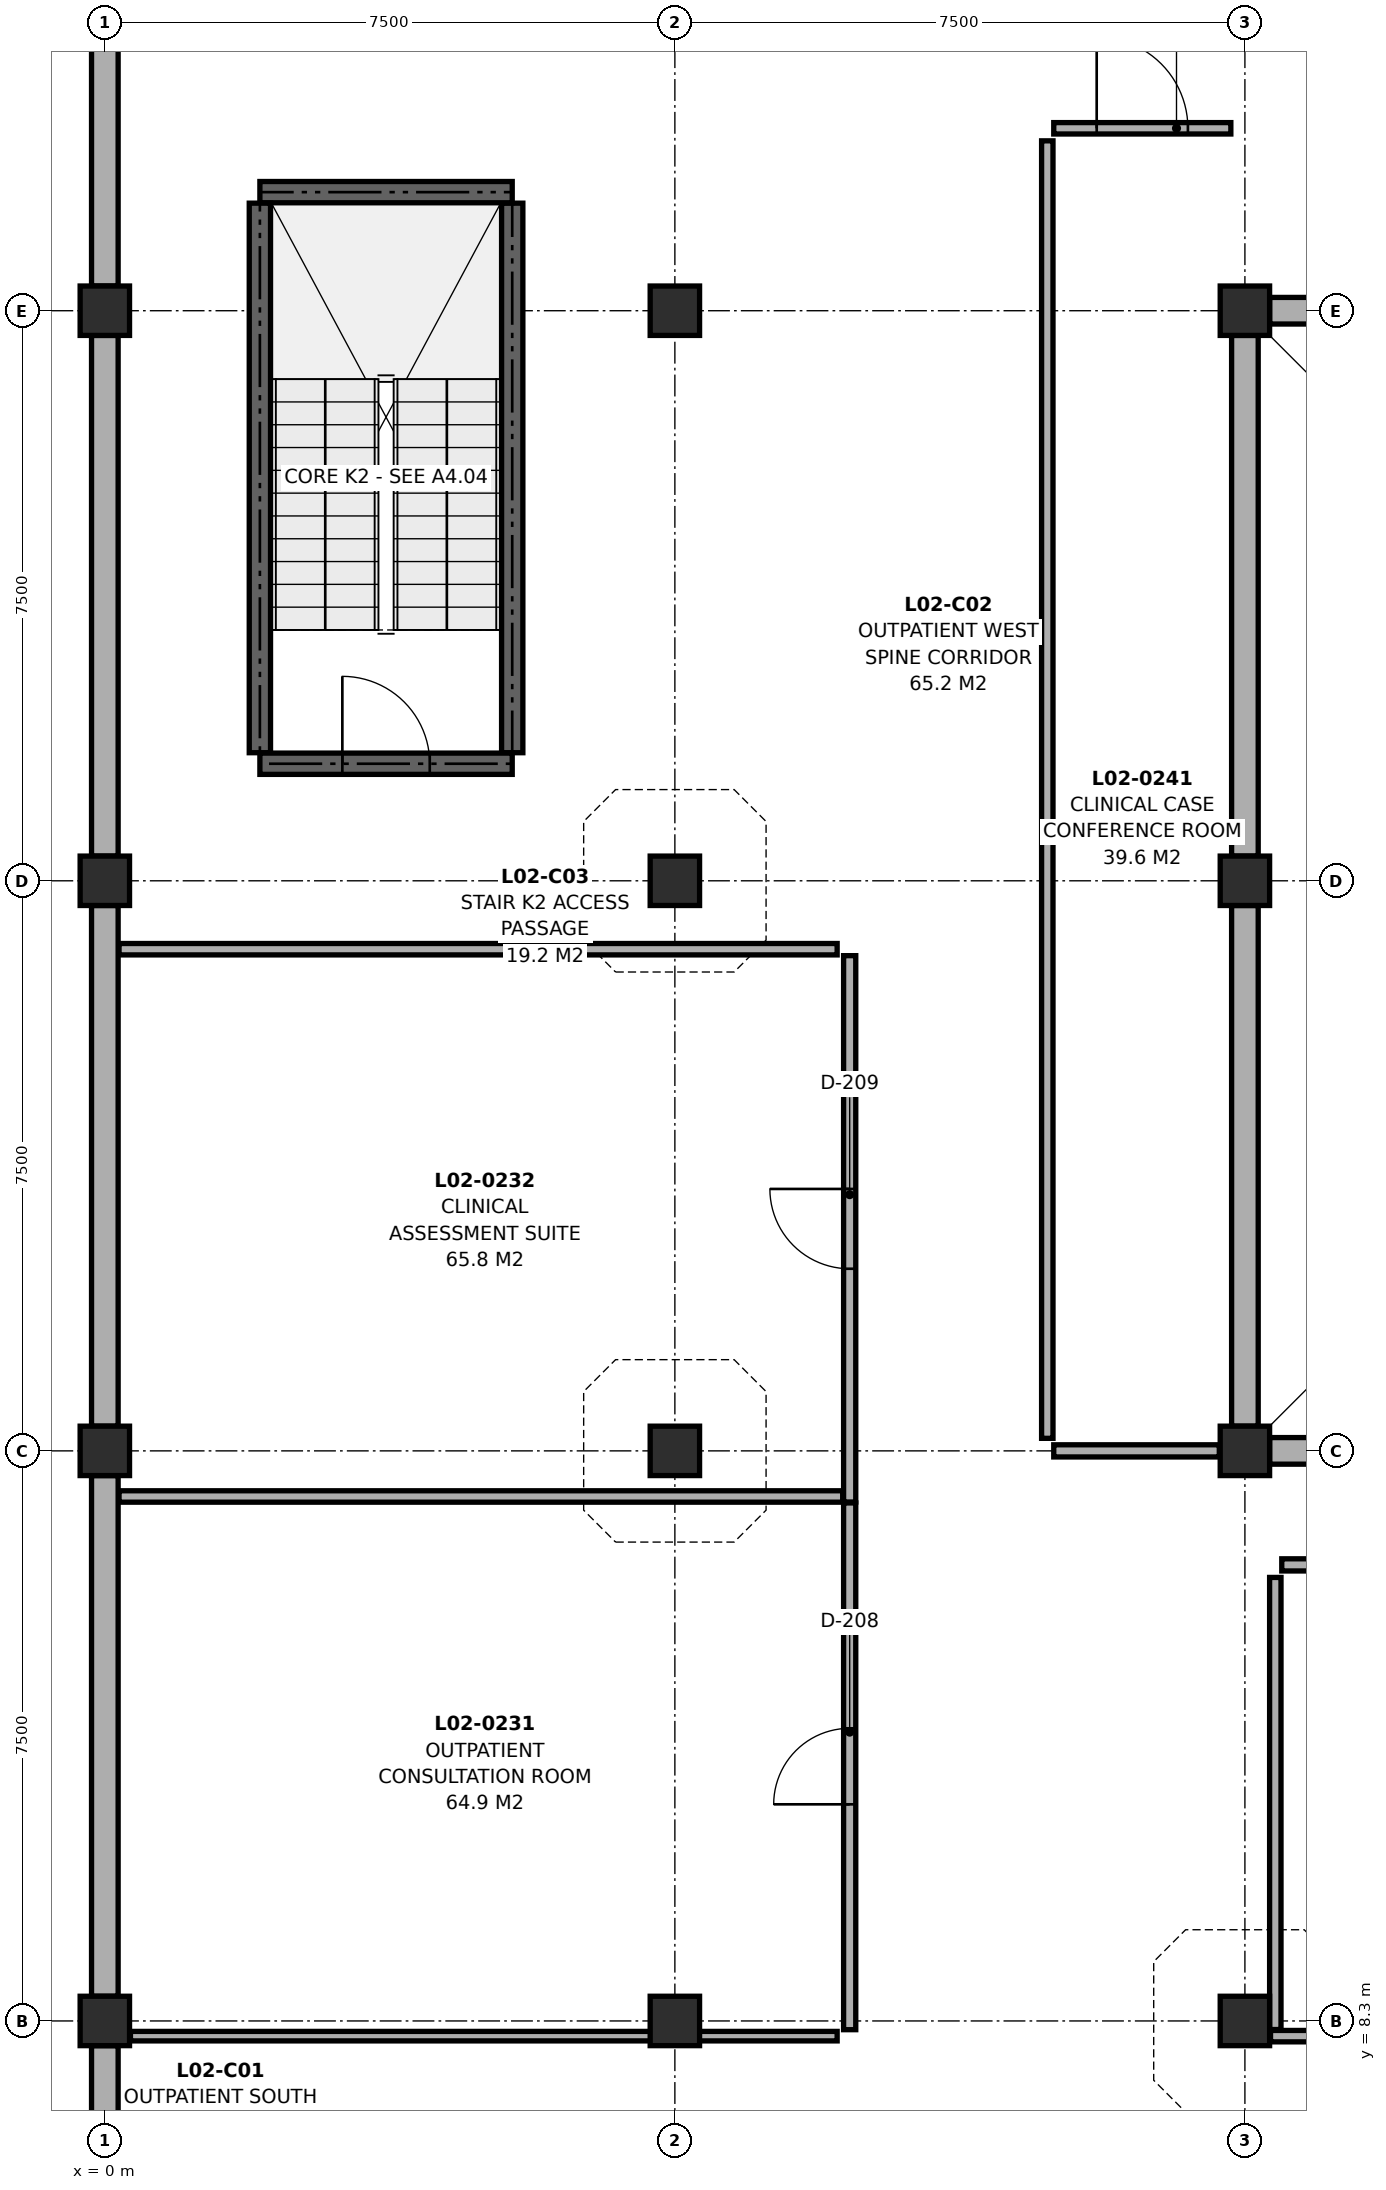
"""IFC4 building model, lengths in metres.
Left out: names, types, materials, properties, quantities, classifications, styles, units other than length and angle.
Written with IfcOpenShell. Run it as: python <this file> out.ifc"""

import sys

from ifc_helpers import new_model, si_unit, direction, frame, frame_2d, origin, origin_2d, place, context, subcontext, project, spatial, rectangle, extrude, element, fill, save


model = new_model("IFC4")
c1 = context("Model", 3, precision=1e-05, world=origin(), true_north=direction((0.0, 1.0)))
c2 = subcontext(c1, "Body", "Model", "MODEL_VIEW")
j1 = project(units=[si_unit("LENGTHUNIT", "METRE"), si_unit("PLANEANGLEUNIT", "RADIAN")], contexts=[c1])
p1 = place(None, origin())
s1 = spatial("IfcSite", under=j1, at=p1, CompositionType="ELEMENT")
p2 = place(p1, origin())
s2 = spatial("IfcBuilding", under=s1, at=p2, CompositionType="ELEMENT")
p3 = place(p2, frame((0.0, 0.0, 9.5)))
s3 = spatial("IfcBuildingStorey", under=s2, at=p3, CompositionType="ELEMENT", Elevation=9.5)
for number, where, z_axis, x_axis in (
    (1, (0.0, 8.3, 0.0), (0.0, 0.0, 1.0), (1.0, 0.0, 0.0)),
    (2, (0.0, 15.8, 0.0), (0.0, 0.0, 1.0), (1.0, 0.0, 0.0)),
    (3, (0.0, 23.3, 0.0), (0.0, 0.0, 1.0), (1.0, 0.0, 0.0)),
    (4, (0.0, 30.8, 0.0), (0.0, 0.0, 1.0), (1.0, 0.0, 0.0)),
    (5, (7.5, 8.3, 0.0), (0.0, 0.0, 1.0), (1.0, 0.0, 0.0)),
    (6, (7.5, 15.8, 0.0), (0.0, 0.0, 1.0), (1.0, 0.0, 0.0)),
    (7, (7.5, 23.3, 0.0), (0.0, 0.0, 1.0), (1.0, 0.0, 0.0)),
    (8, (7.5, 30.8, 0.0), (0.0, 0.0, 1.0), (1.0, 0.0, 0.0)),
    (9, (15.0, 8.3, 0.0), (0.0, 0.0, 1.0), (1.0, 0.0, 0.0)),
    (10, (15.0, 15.8, 0.0), (0.0, 0.0, 1.0), (1.0, 0.0, 0.0)),
    (11, (15.0, 23.3, 0.0), (0.0, 0.0, 1.0), (1.0, 0.0, 0.0)),
    (12, (15.0, 30.8, 0.0), (0.0, 0.0, 1.0), (1.0, 0.0, 0.0)),
):
    element("IfcColumn", number, at=place(p3, frame(where, z_axis=z_axis, x_axis=x_axis)), inside=s3, PredefinedType="COLUMN", context=c2, shape_type="SweptSolid", body=[
        extrude(rectangle(XDim=0.65, YDim=0.65, at=origin_2d()), origin(), (0.0, 0.0, 1.0), 3.7),
    ])
p4 = place(p3, frame((0.0, 1.125, 0.0), z_axis=(0.0, 0.0, 1.0), x_axis=(0.0, 1.0, 0.0)))
e13 = element("IfcWall", 13, at=p4, inside=s3, PredefinedType="SOLIDWALL", context=c2, shape_type="SweptSolid", body=[
    extrude(rectangle(XDim=6.85, YDim=0.35, at=frame_2d((3.425, 0.0))), origin(), (0.0, 0.0, 1.0), 2.985),
])
for number, where, z_axis, x_axis in (
    (14, (0.0, 8.625, 0.0), (0.0, 0.0, 1.0), (0.0, 1.0, 0.0)),
    (15, (0.0, 16.125, 0.0), (0.0, 0.0, 1.0), (0.0, 1.0, 0.0)),
    (16, (0.0, 23.625, 0.0), (0.0, 0.0, 1.0), (0.0, 1.0, 0.0)),
    (17, (0.0, 31.125, 0.0), (0.0, 0.0, 1.0), (0.0, 1.0, 0.0)),
    (18, (15.325, 15.8, 0.0), (0.0, 0.0, 1.0), (1.0, 0.0, 0.0)),
    (19, (22.175, 30.8, 0.0), (0.0, 0.0, 1.0), (-1.0, 0.0, 0.0)),
    (20, (15.0, 30.475, 0.0), (0.0, 0.0, 1.0), (0.0, -1.0, 0.0)),
    (21, (15.0, 22.975, 0.0), (0.0, 0.0, 1.0), (0.0, -1.0, 0.0)),
):
    element("IfcWall", number, at=place(p3, frame(where, z_axis=z_axis, x_axis=x_axis)), inside=s3, PredefinedType="SOLIDWALL", context=c2, shape_type="SweptSolid", body=[
        extrude(rectangle(XDim=6.85, YDim=0.35, at=frame_2d((3.425, 0.0))), origin(), (0.0, 0.0, 1.0), 2.785),
    ])
p5 = place(p3, frame((5.36, 24.985, 0.0), z_axis=(0.0, 0.0, 1.0), x_axis=(0.0, 1.0, 0.0)))
e22 = element("IfcWall", 22, at=p5, inside=s3, PredefinedType="SHEAR", context=c2, shape_type="SweptSolid", body=[
    extrude(rectangle(XDim=7.23, YDim=0.28, at=frame_2d((3.615, 0.0))), origin(), (0.0, 0.0, 1.0), 3.7),
])
p6 = place(p3, frame((5.36, 32.36, 0.0), z_axis=(0.0, 0.0, 1.0), x_axis=(-1.0, 0.0, 0.0)))
e23 = element("IfcWall", 23, at=p6, inside=s3, PredefinedType="SHEAR", context=c2, shape_type="SweptSolid", body=[
    extrude(rectangle(XDim=3.32, YDim=0.28, at=frame_2d((1.66, 0.0))), origin(), (0.0, 0.0, 1.0), 3.7),
])
p7 = place(p3, frame((2.04, 32.215, 0.0), z_axis=(0.0, 0.0, 1.0), x_axis=(0.0, -1.0, 0.0)))
e24 = element("IfcWall", 24, at=p7, inside=s3, PredefinedType="SHEAR", context=c2, shape_type="SweptSolid", body=[
    extrude(rectangle(XDim=7.23, YDim=0.28, at=frame_2d((3.615, 0.0))), origin(), (0.0, 0.0, 1.0), 3.7),
])
p8 = place(p3, frame((2.04, 24.84, 0.0), z_axis=(0.0, 0.0, 1.0), x_axis=(1.0, 0.0, 0.0)))
e25 = element("IfcWall", 25, at=p8, inside=s3, PredefinedType="SHEAR", context=c2, shape_type="SweptSolid", body=[
    extrude(rectangle(XDim=3.32, YDim=0.28, at=frame_2d((1.66, 0.0))), origin(), (0.0, 0.0, 1.0), 3.7),
])
p9 = place(p8, frame((1.085, 0.0, 0.0)))
e26 = element("IfcOpeningElement", 26, at=p9, cuts=e25, PredefinedType="OPENING", context=c2, shape_type="SweptSolid", body=[
    extrude(rectangle(XDim=1.15, YDim=2.15, at=frame_2d((0.575, 1.075))), frame((0.0, 0.152, 0.0), z_axis=(0.0, -1.0, 0.0), x_axis=(1.0, 0.0, 0.0)), (0.0, 0.0, 1.0), 0.304),
])
p10 = place(p3, frame((15.337, 8.1, 0.0), z_axis=(0.0, 0.0, 1.0), x_axis=(1.0, 0.0, 0.0)))
e27 = element("IfcWall", 27, at=p10, inside=s3, PredefinedType="PARTITIONING", context=c2, shape_type="SweptSolid", body=[
    extrude(rectangle(XDim=14.571, YDim=0.15, at=frame_2d((7.286, 0.0))), origin(), (0.0, 0.0, 1.0), 2.785),
])
p11 = place(p10, frame((7.677, 0.0, 0.0)))
e28 = element("IfcOpeningElement", 28, at=p11, cuts=e27, PredefinedType="OPENING", context=c2, shape_type="SweptSolid", body=[
    extrude(rectangle(XDim=1.56, YDim=2.3, at=frame_2d((0.78, 1.15))), frame((0.0, 0.087, 0.0), z_axis=(0.0, -1.0, 0.0), x_axis=(1.0, 0.0, 0.0)), (0.0, 0.0, 1.0), 0.174),
])
p12 = place(p3, frame((9.8, 8.185, 0.0), z_axis=(0.0, 0.0, 1.0), x_axis=(0.0, 1.0, 0.0)))
e29 = element("IfcWall", 29, at=p12, inside=s3, PredefinedType="PARTITIONING", context=c2, shape_type="SweptSolid", body=[
    extrude(rectangle(XDim=6.93, YDim=0.16, at=frame_2d((3.465, 0.0))), origin(), (0.0, 0.0, 1.0), 2.785),
])
p13 = place(p12, frame((2.965, 0.0, 0.0)))
e30 = element("IfcOpeningElement", 30, at=p13, cuts=e29, PredefinedType="OPENING", context=c2, shape_type="SweptSolid", body=[
    extrude(rectangle(XDim=1.0, YDim=2.15, at=frame_2d((0.5, 1.075))), frame((0.0, 0.092, 0.0), z_axis=(0.0, -1.0, 0.0), x_axis=(1.0, 0.0, 0.0)), (0.0, 0.0, 1.0), 0.184),
])
p14 = place(p3, frame((9.8, 15.127, 0.0), z_axis=(0.0, 0.0, 1.0), x_axis=(0.0, 1.0, 0.0)))
e31 = element("IfcWall", 31, at=p14, inside=s3, PredefinedType="PARTITIONING", context=c2, shape_type="SweptSolid", body=[
    extrude(rectangle(XDim=7.188, YDim=0.16, at=frame_2d((3.594, 0.0))), origin(), (0.0, 0.0, 1.0), 2.785),
])
p15 = place(p14, frame((3.069, 0.0, 0.0)))
e32 = element("IfcOpeningElement", 32, at=p15, cuts=e31, PredefinedType="OPENING", context=c2, shape_type="SweptSolid", body=[
    extrude(rectangle(XDim=1.05, YDim=2.15, at=frame_2d((0.525, 1.075))), frame((0.0, 0.092, 0.0), z_axis=(0.0, -1.0, 0.0), x_axis=(1.0, 0.0, 0.0)), (0.0, 0.0, 1.0), 0.184),
])
p16 = place(p3, frame((12.485, 33.2, 0.0), z_axis=(0.0, 0.0, 1.0), x_axis=(1.0, 0.0, 0.0)))
e33 = element("IfcWall", 33, at=p16, inside=s3, PredefinedType="PARTITIONING", context=c2, shape_type="SweptSolid", body=[
    extrude(rectangle(XDim=2.33, YDim=0.15, at=frame_2d((1.165, 0.0))), origin(), (0.0, 0.0, 1.0), 2.785),
])
p17 = place(p16, frame((0.565, 0.0, 0.0)))
e34 = element("IfcOpeningElement", 34, at=p17, cuts=e33, PredefinedType="OPENING", context=c2, shape_type="SweptSolid", body=[
    extrude(rectangle(XDim=1.2, YDim=2.15, at=frame_2d((0.6, 1.075))), frame((0.0, 0.087, 0.0), z_axis=(0.0, -1.0, 0.0), x_axis=(1.0, 0.0, 0.0)), (0.0, 0.0, 1.0), 0.174),
])
p18 = place(p3, frame((15.485, 14.3, 0.0), z_axis=(0.0, 0.0, 1.0), x_axis=(1.0, 0.0, 0.0)))
e35 = element("IfcWall", 35, at=p18, inside=s3, PredefinedType="PARTITIONING", context=c2, shape_type="SweptSolid", body=[
    extrude(rectangle(XDim=14.59, YDim=0.16, at=frame_2d((7.295, 0.0))), origin(), (0.0, 0.0, 1.0), 2.785),
])
p19 = place(p3, frame((12.485, 15.8, 0.0), z_axis=(0.0, 0.0, 1.0), x_axis=(1.0, 0.0, 0.0)))
e36 = element("IfcWall", 36, at=p19, inside=s3, PredefinedType="PARTITIONING", context=c2, shape_type="SweptSolid", body=[
    extrude(rectangle(XDim=2.178, YDim=0.16, at=frame_2d((1.089, 0.0))), origin(), (0.0, 0.0, 1.0), 2.785),
])
p20 = place(p3, frame((15.4, 8.187, 0.0), z_axis=(0.0, 0.0, 1.0), x_axis=(0.0, 1.0, 0.0)))
e37 = element("IfcWall", 37, at=p20, inside=s3, PredefinedType="PARTITIONING", context=c2, shape_type="SweptSolid", body=[
    extrude(rectangle(XDim=5.948, YDim=0.15, at=frame_2d((2.974, 0.0))), origin(), (0.0, 0.0, 1.0), 2.785),
])
p21 = place(p3, frame((0.337, 8.1, 0.0), z_axis=(0.0, 0.0, 1.0), x_axis=(1.0, 0.0, 0.0)))
e38 = element("IfcWall", 38, at=p21, inside=s3, PredefinedType="PARTITIONING", context=c2, shape_type="SweptSolid", body=[
    extrude(rectangle(XDim=9.298, YDim=0.125, at=frame_2d((4.649, 0.0))), origin(), (0.0, 0.0, 1.0), 2.785),
])
p22 = place(p3, frame((0.187, 15.2, 0.0), z_axis=(0.0, 0.0, 1.0), x_axis=(1.0, 0.0, 0.0)))
e39 = element("IfcWall", 39, at=p22, inside=s3, PredefinedType="PARTITIONING", context=c2, shape_type="SweptSolid", body=[
    extrude(rectangle(XDim=9.521, YDim=0.15, at=frame_2d((4.76, 0.0))), origin(), (0.0, 0.0, 1.0), 2.785),
])
p23 = place(p3, frame((0.187, 22.4, 0.0), z_axis=(0.0, 0.0, 1.0), x_axis=(1.0, 0.0, 0.0)))
e40 = element("IfcWall", 40, at=p23, inside=s3, PredefinedType="PARTITIONING", context=c2, shape_type="SweptSolid", body=[
    extrude(rectangle(XDim=9.448, YDim=0.15, at=frame_2d((4.724, 0.0))), origin(), (0.0, 0.0, 1.0), 2.785),
])
p24 = place(p3, frame((12.4, 15.965, 0.0), z_axis=(0.0, 0.0, 1.0), x_axis=(0.0, 1.0, 0.0)))
e41 = element("IfcWall", 41, at=p24, inside=s3, PredefinedType="PARTITIONING", context=c2, shape_type="SweptSolid", body=[
    extrude(rectangle(XDim=17.07, YDim=0.15, at=frame_2d((8.535, 0.0))), origin(), (0.0, 0.0, 1.0), 2.785),
])
p25 = place(p9, origin())
e42 = element("IfcDoor", 42, at=p25, inside=s3, OperationType="SINGLE_SWING_LEFT", PredefinedType="DOOR", context=c2, shape_type="SweptSolid", body=[
    extrude(rectangle(XDim=1.15, YDim=2.15, at=frame_2d((0.575, 1.075))), frame((0.0, 0.025, 0.0), z_axis=(0.0, -1.0, 0.0), x_axis=(1.0, 0.0, 0.0)), (0.0, 0.0, 1.0), 0.05),
])
fill(e26, e42)
p26 = place(p13, origin())
e43 = element("IfcDoor", 43, at=p26, inside=s3, OperationType="SINGLE_SWING_LEFT", PredefinedType="DOOR", context=c2, shape_type="SweptSolid", body=[
    extrude(rectangle(XDim=1.0, YDim=2.15, at=frame_2d((0.5, 1.075))), frame((0.0, 0.025, 0.0), z_axis=(0.0, -1.0, 0.0), x_axis=(1.0, 0.0, 0.0)), (0.0, 0.0, 1.0), 0.05),
])
fill(e30, e43)
p27 = place(p15, origin())
e44 = element("IfcDoor", 44, at=p27, inside=s3, OperationType="SINGLE_SWING_RIGHT", PredefinedType="DOOR", context=c2, shape_type="SweptSolid", body=[
    extrude(rectangle(XDim=1.05, YDim=2.15, at=frame_2d((0.525, 1.075))), frame((0.0, 0.025, 0.0), z_axis=(0.0, -1.0, 0.0), x_axis=(1.0, 0.0, 0.0)), (0.0, 0.0, 1.0), 0.05),
])
fill(e32, e44)
p28 = place(p17, origin())
e45 = element("IfcDoor", 45, at=p28, inside=s3, OperationType="SINGLE_SWING_LEFT", PredefinedType="DOOR", context=c2, shape_type="SweptSolid", body=[
    extrude(rectangle(XDim=1.2, YDim=2.15, at=frame_2d((0.6, 1.075))), frame((0.0, 0.025, 0.0), z_axis=(0.0, -1.0, 0.0), x_axis=(1.0, 0.0, 0.0)), (0.0, 0.0, 1.0), 0.05),
])
fill(e34, e45)
save(model, sys.argv[1])
